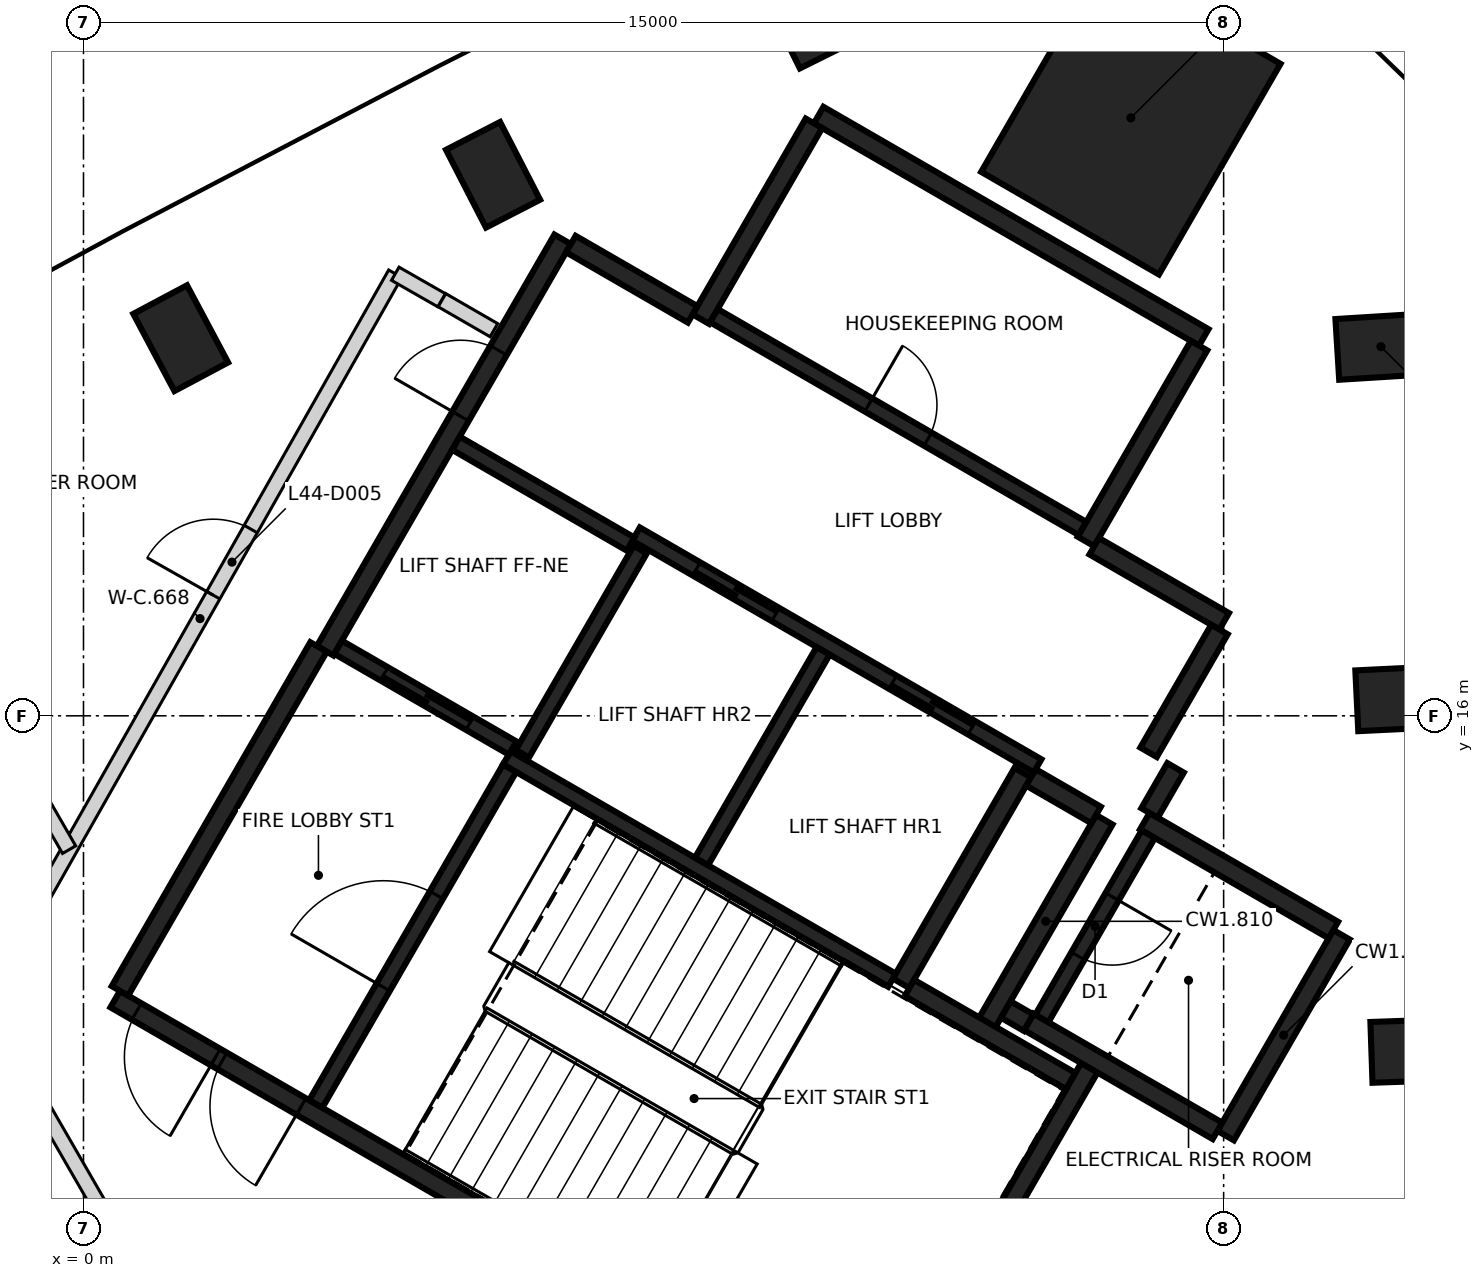
"""IFC4 building model, lengths in metres.
Left out: names, types, materials, properties, quantities, classifications, styles, units other than length and angle.
Written with IfcOpenShell. Run it as: python <this file> out.ifc"""

import sys

from ifc_helpers import new_model, si_unit, direction, frame, frame_2d, origin, origin_2d, place, context, subcontext, project, spatial, rectangle, extrude, element, fill, save


model = new_model("IFC4")
c1 = context("Model", 3, precision=1e-05, world=origin(), true_north=direction((0.0, 1.0)))
c2 = subcontext(c1, "Body", "Model", "MODEL_VIEW")
j1 = project(units=[si_unit("LENGTHUNIT", "METRE"), si_unit("PLANEANGLEUNIT", "RADIAN")], contexts=[c1])
p1 = place(None, origin())
s1 = spatial("IfcSite", under=j1, at=p1, CompositionType="ELEMENT")
p2 = place(p1, origin())
s2 = spatial("IfcBuilding", under=s1, at=p2, CompositionType="ELEMENT")
p3 = place(p2, frame((0.0, 0.0, 179.2)))
s3 = spatial("IfcBuildingStorey", under=s2, at=p3, CompositionType="ELEMENT", Elevation=179.2)
for number, where, z_axis, x_axis in (
    (1, (17.519, 11.592, -0.35), (0.0, 0.0, 1.0), (0.999, 0.034, 0.0)),
    (2, (17.326, 16.226, -0.35), (0.0, 0.0, 1.0), (0.999, 0.048, 0.0)),
    (3, (17.07, 20.856, -0.35), (0.0, 0.0, 1.0), (0.998, 0.062, 0.0)),
    (4, (9.527, 25.211, -0.35), (0.0, 0.0, 1.0), (-0.445, 0.895, 0.0)),
    (5, (5.388, 23.118, -0.35), (0.0, 0.0, 1.0), (-0.458, 0.889, 0.0)),
    (6, (1.279, 20.968, -0.35), (0.0, 0.0, 1.0), (-0.47, 0.883, 0.0)),
):
    element("IfcColumn", number, at=place(p3, frame(where, z_axis=z_axis, x_axis=x_axis)), inside=s3, PredefinedType="COLUMN", context=c2, shape_type="SweptSolid", body=[
        extrude(rectangle(XDim=1.15, YDim=0.8, at=origin_2d()), origin(), (0.0, 0.0, 1.0), 3.6),
    ])
p4 = place(p3, frame((13.78, 23.867, -0.35), z_axis=(0.0, 0.0, 1.0), x_axis=(0.5, 0.866025403784, 0.0)))
e7 = element("IfcColumn", 7, at=p4, inside=s3, PredefinedType="COLUMN", context=c2, shape_type="SweptSolid", body=[
    extrude(rectangle(XDim=3.2, YDim=2.7, at=origin_2d()), origin(), (0.0, 0.0, 1.0), 3.6),
])
p5 = place(p3, frame((10.42, 6.498, 0.0), z_axis=(0.0, 0.0, 1.0), x_axis=(-0.866021906294, 0.500006057782, 0.0)))
e8 = element("IfcWall", 8, at=p5, inside=s3, PredefinedType="SHEAR", context=c2, shape_type="SweptSolid", body=[
    extrude(rectangle(XDim=11.55, YDim=0.25, at=frame_2d((5.775, 0.0))), origin(), (0.0, 0.0, 1.0), 3.25),
])
p6 = place(p5, frame((10.025, 0.0, 0.0)))
e9 = element("IfcOpeningElement", 9, at=p6, cuts=e8, PredefinedType="OPENING", context=c2, shape_type="SweptSolid", body=[
    extrude(rectangle(XDim=1.2, YDim=2.1, at=frame_2d((0.6, 1.05))), frame((0.0, 0.135, 0.0), z_axis=(0.0, -1.0, 0.0), x_axis=(1.0, 0.0, 0.0)), (0.0, 0.0, 1.0), 0.27),
])
p7 = place(p5, frame((8.725, 0.0, 0.0)))
e10 = element("IfcOpeningElement", 10, at=p7, cuts=e8, PredefinedType="OPENING", context=c2, shape_type="SweptSolid", body=[
    extrude(rectangle(XDim=1.2, YDim=2.1, at=frame_2d((0.6, 1.05))), frame((0.0, 0.135, 0.0), z_axis=(0.0, -1.0, 0.0), x_axis=(1.0, 0.0, 0.0)), (0.0, 0.0, 1.0), 0.27),
])
p8 = place(p3, frame((3.179, 16.856, 0.0), z_axis=(0.0, 0.0, 1.0), x_axis=(0.500004234368, 0.866022959057, 0.0)))
e11 = element("IfcWall", 11, at=p8, inside=s3, PredefinedType="SHEAR", context=c2, shape_type="SweptSolid", body=[
    extrude(rectangle(XDim=6.25, YDim=0.25, at=frame_2d((3.125, 0.0))), origin(), (0.0, 0.0, 1.0), 3.25),
])
p9 = place(p8, frame((3.563, 0.0, 0.0)))
e12 = element("IfcOpeningElement", 12, at=p9, cuts=e11, PredefinedType="OPENING", context=c2, shape_type="SweptSolid", body=[
    extrude(rectangle(XDim=1.0, YDim=2.1, at=frame_2d((0.5, 1.05))), frame((0.0, 0.135, 0.0), z_axis=(0.0, -1.0, 0.0), x_axis=(1.0, 0.0, 0.0)), (0.0, 0.0, 1.0), 0.27),
])
p10 = place(p3, frame((9.673, 23.903, 0.0), z_axis=(0.0, 0.0, 1.0), x_axis=(0.86603616409, -0.499981362141, 0.0)))
e13 = element("IfcWall", 13, at=p10, inside=s3, PredefinedType="SHEAR", context=c2, shape_type="SweptSolid", body=[
    extrude(rectangle(XDim=5.85, YDim=0.25, at=frame_2d((2.925, 0.0))), origin(), (0.0, 0.0, 1.0), 3.25),
])
p11 = place(p3, frame((0.48, 12.381, 0.0), z_axis=(0.0, 0.0, 1.0), x_axis=(0.49999885962, 0.866026062182, 0.0)))
e14 = element("IfcWall", 14, at=p11, inside=s3, PredefinedType="SHEAR", context=c2, shape_type="SweptSolid", body=[
    extrude(rectangle(XDim=5.225, YDim=0.25, at=frame_2d((2.612, 0.0))), origin(), (0.0, 0.0, 1.0), 3.25),
])
p12 = place(p3, frame((13.238, 11.378, 0.0), z_axis=(0.0, 0.0, 1.0), x_axis=(-0.500008851346, -0.866020293397, 0.0)))
e15 = element("IfcWall", 15, at=p12, inside=s3, PredefinedType="SHEAR", context=c2, shape_type="SweptSolid", body=[
    extrude(rectangle(XDim=5.51, YDim=0.25, at=frame_2d((2.755, 0.0))), origin(), (0.0, 0.0, 1.0), 3.25),
])
p13 = place(p3, frame((12.357, 15.252, 0.0), z_axis=(0.0, 0.0, 1.0), x_axis=(-0.500028443584, -0.866008981251, 0.0)))
e16 = element("IfcWall", 16, at=p13, inside=s3, PredefinedType="SHEAR", context=c2, shape_type="SweptSolid", body=[
    extrude(rectangle(XDim=3.2, YDim=0.25, at=frame_2d((1.6, 0.0))), origin(), (0.0, 0.0, 1.0), 3.25),
])
for number, where, z_axis, x_axis in (
    (17, (8.123, 21.219, 0.0), (0.0, 0.0, 1.0), (0.5, 0.866, 0.0)),
    (18, (14.676, 20.87, 0.0), (0.0, 0.0, 1.0), (-0.5, -0.866, 0.0)),
):
    element("IfcWall", number, at=place(p3, frame(where, z_axis=z_axis, x_axis=x_axis)), inside=s3, PredefinedType="SHEAR", context=c2, shape_type="SweptSolid", body=[
        extrude(rectangle(XDim=2.975, YDim=0.25, at=frame_2d((1.487, 0.0))), origin(), (0.0, 0.0, 1.0), 3.25),
    ])
p14 = place(p3, frame((16.552, 13.119, 0.0), z_axis=(0.0, 0.0, 1.0), x_axis=(-0.499978833458, -0.866037623948, 0.0)))
e19 = element("IfcWall", 19, at=p14, inside=s3, PredefinedType="SHEAR", context=c2, shape_type="SweptSolid", body=[
    extrude(rectangle(XDim=3.05, YDim=0.25, at=frame_2d((1.525, 0.0))), origin(), (0.0, 0.0, 1.0), 3.25),
])
p15 = place(p3, frame((14.918, 10.54, 0.0), z_axis=(0.0, 0.0, 1.0), x_axis=(-0.866063538972, 0.499933942099, 0.0)))
e20 = element("IfcWall", 20, at=p15, inside=s3, PredefinedType="SHEAR", context=c2, shape_type="SweptSolid", body=[
    extrude(rectangle(XDim=2.865, YDim=0.25, at=frame_2d((1.432, 0.0))), origin(), (0.0, 0.0, 1.0), 3.25),
])
p16 = place(p3, frame((13.963, 14.614, 0.0), z_axis=(0.0, 0.0, 1.0), x_axis=(0.866042235819, -0.499970844928, 0.0)))
e21 = element("IfcWall", 21, at=p16, inside=s3, PredefinedType="SHEAR", context=c2, shape_type="SweptSolid", body=[
    extrude(rectangle(XDim=2.865, YDim=0.25, at=frame_2d((1.432, 0.0))), origin(), (0.0, 0.0, 1.0), 3.25),
])
p17 = place(p3, frame((11.888, 11.961, 0.0), z_axis=(0.0, 0.0, 1.0), x_axis=(0.500003324108, 0.866023484601, 0.0)))
e22 = element("IfcWall", 22, at=p17, inside=s3, PredefinedType="SHEAR", context=c2, shape_type="SweptSolid", body=[
    extrude(rectangle(XDim=3.085, YDim=0.25, at=frame_2d((1.542, 0.0))), origin(), (0.0, 0.0, 1.0), 3.25),
])
p18 = place(p3, frame((10.865, 12.418, 0.0), z_axis=(0.0, 0.0, 1.0), x_axis=(0.866026229868, -0.499998569178, 0.0)))
e23 = element("IfcWall", 23, at=p18, inside=s3, PredefinedType="SHEAR", context=c2, shape_type="SweptSolid", body=[
    extrude(rectangle(XDim=2.449, YDim=0.25, at=frame_2d((1.225, 0.0))), origin(), (0.0, 0.0, 1.0), 3.25),
])
p19 = place(p3, frame((13.297, 18.231, 0.0), z_axis=(0.0, 0.0, 1.0), x_axis=(0.866043531843, -0.499968599967, 0.0)))
e24 = element("IfcWall", 24, at=p19, inside=s3, PredefinedType="SHEAR", context=c2, shape_type="SweptSolid", body=[
    extrude(rectangle(XDim=1.975, YDim=0.25, at=frame_2d((0.987, 0.0))), origin(), (0.0, 0.0, 1.0), 3.25),
])
p20 = place(p3, frame((6.413, 22.206, 0.0), z_axis=(0.0, 0.0, 1.0), x_axis=(0.866016279763, -0.500015802937, 0.0)))
e25 = element("IfcWall", 25, at=p20, inside=s3, PredefinedType="SHEAR", context=c2, shape_type="SweptSolid", body=[
    extrude(rectangle(XDim=1.849, YDim=0.25, at=frame_2d((0.925, 0.0))), origin(), (0.0, 0.0, 1.0), 3.25),
])
p21 = place(p3, frame((14.945, 17.135, 0.0), z_axis=(0.0, 0.0, 1.0), x_axis=(-0.499983108224, -0.866035156036, 0.0)))
e26 = element("IfcWall", 26, at=p21, inside=s3, PredefinedType="SHEAR", context=c2, shape_type="SweptSolid", body=[
    extrude(rectangle(XDim=1.865, YDim=0.25, at=frame_2d((0.932, 0.0))), origin(), (0.0, 0.0, 1.0), 3.25),
])
p22 = place(p3, frame((13.322, 14.695, 0.0), z_axis=(0.0, 0.0, 1.0), x_axis=(-0.866017078145, 0.500014420154, 0.0)))
e27 = element("IfcWall", 27, at=p22, inside=s3, PredefinedType="SHEAR", context=c2, shape_type="SweptSolid", body=[
    extrude(rectangle(XDim=0.989, YDim=0.25, at=frame_2d((0.495, 0.0))), origin(), (0.0, 0.0, 1.0), 3.25),
])
p23 = place(p3, frame((14.368, 15.315, 0.0), z_axis=(0.0, 0.0, 1.0), x_axis=(-0.499897359611, -0.866084655132, 0.0)))
e28 = element("IfcWall", 28, at=p23, inside=s3, PredefinedType="SHEAR", context=c2, shape_type="SweptSolid", body=[
    extrude(rectangle(XDim=0.685, YDim=0.25, at=frame_2d((0.342, 0.0))), origin(), (0.0, 0.0, 1.0), 3.25),
])
p24 = place(p3, frame((12.433, 11.964, 0.0), z_axis=(0.0, 0.0, 1.0), x_axis=(-0.866055875208, 0.499947218231, 0.0)))
e29 = element("IfcWall", 29, at=p24, inside=s3, PredefinedType="SHEAR", context=c2, shape_type="SweptSolid", body=[
    extrude(rectangle(XDim=0.345, YDim=0.25, at=frame_2d((0.172, 0.0))), origin(), (0.0, 0.0, 1.0), 3.25),
])
p25 = place(p3, frame((12.552, 15.342, 0.0), z_axis=(0.0, 0.0, 1.0), x_axis=(-0.866030299012, 0.499991521122, 0.0)))
e30 = element("IfcWall", 30, at=p25, inside=s3, PredefinedType="SHEAR", context=c2, shape_type="SweptSolid", body=[
    extrude(rectangle(XDim=6.1, YDim=0.2, at=frame_2d((3.05, 0.0))), origin(), (0.0, 0.0, 1.0), 3.25),
])
p26 = place(p25, frame((1.0, 0.0, 0.0)))
e31 = element("IfcOpeningElement", 31, at=p26, cuts=e30, PredefinedType="OPENING", context=c2, shape_type="SweptSolid", body=[
    extrude(rectangle(XDim=1.2, YDim=2.1, at=frame_2d((0.6, 1.05))), frame((0.0, 0.11, 0.0), z_axis=(0.0, -1.0, 0.0), x_axis=(1.0, 0.0, 0.0)), (0.0, 0.0, 1.0), 0.22),
])
p27 = place(p25, frame((3.982, 0.0, 0.0)))
e32 = element("IfcOpeningElement", 32, at=p27, cuts=e30, PredefinedType="OPENING", context=c2, shape_type="SweptSolid", body=[
    extrude(rectangle(XDim=1.2, YDim=2.1, at=frame_2d((0.6, 1.05))), frame((0.0, 0.11, 0.0), z_axis=(0.0, -1.0, 0.0), x_axis=(1.0, 0.0, 0.0)), (0.0, 0.0, 1.0), 0.22),
])
p28 = place(p3, frame((10.636, 12.521, 0.0), z_axis=(0.0, 0.0, 1.0), x_axis=(-0.866013252188, 0.500021046592, 0.0)))
e33 = element("IfcWall", 33, at=p28, inside=s3, PredefinedType="SHEAR", context=c2, shape_type="SweptSolid", body=[
    extrude(rectangle(XDim=5.851, YDim=0.2, at=frame_2d((2.925, 0.0))), origin(), (0.0, 0.0, 1.0), 3.25),
])
p29 = place(p3, frame((8.294, 21.264, 0.0), z_axis=(0.0, 0.0, 1.0), x_axis=(0.866025812541, -0.499999292012, 0.0)))
e34 = element("IfcWall", 34, at=p29, inside=s3, PredefinedType="SHEAR", context=c2, shape_type="SweptSolid", body=[
    extrude(rectangle(XDim=5.598, YDim=0.2, at=frame_2d((2.799, 0.0))), origin(), (0.0, 0.0, 1.0), 3.25),
])
p30 = place(p29, frame((2.349, 0.0, 0.0)))
e35 = element("IfcOpeningElement", 35, at=p30, cuts=e34, PredefinedType="OPENING", context=c2, shape_type="SweptSolid", body=[
    extrude(rectangle(XDim=0.9, YDim=2.1, at=frame_2d((0.45, 1.05))), frame((0.0, 0.11, 0.0), z_axis=(0.0, -1.0, 0.0), x_axis=(1.0, 0.0, 0.0)), (0.0, 0.0, 1.0), 0.22),
])
p31 = place(p3, frame((3.057, 10.895, 0.0), z_axis=(0.0, 0.0, 1.0), x_axis=(0.500027839223, 0.866009330205, 0.0)))
e36 = element("IfcWall", 36, at=p31, inside=s3, PredefinedType="SHEAR", context=c2, shape_type="SweptSolid", body=[
    extrude(rectangle(XDim=5.098, YDim=0.2, at=frame_2d((2.549, 0.0))), origin(), (0.0, 0.0, 1.0), 3.25),
])
p32 = place(p31, frame((1.774, 0.0, 0.0)))
e37 = element("IfcOpeningElement", 37, at=p32, cuts=e36, PredefinedType="OPENING", context=c2, shape_type="SweptSolid", body=[
    extrude(rectangle(XDim=1.4, YDim=2.1, at=frame_2d((0.7, 1.05))), frame((0.0, 0.11, 0.0), z_axis=(0.0, -1.0, 0.0), x_axis=(1.0, 0.0, 0.0)), (0.0, 0.0, 1.0), 0.22),
])
p33 = place(p3, frame((8.132, 14.084, 0.0), z_axis=(0.0, 0.0, 1.0), x_axis=(0.500030834389, 0.86600760081, 0.0)))
e38 = element("IfcWall", 38, at=p33, inside=s3, PredefinedType="SHEAR", context=c2, shape_type="SweptSolid", body=[
    extrude(rectangle(XDim=3.198, YDim=0.2, at=frame_2d((1.599, 0.0))), origin(), (0.0, 0.0, 1.0), 3.25),
])
p34 = place(p3, frame((14.008, 14.442, 0.0), z_axis=(0.0, 0.0, 1.0), x_axis=(-0.499986818241, -0.866033014143, 0.0)))
e39 = element("IfcWall", 39, at=p34, inside=s3, PredefinedType="SHEAR", context=c2, shape_type="SweptSolid", body=[
    extrude(rectangle(XDim=2.798, YDim=0.2, at=frame_2d((1.399, 0.0))), origin(), (0.0, 0.0, 1.0), 3.25),
])
p35 = place(p34, frame((0.949, 0.0, 0.0)))
e40 = element("IfcOpeningElement", 40, at=p35, cuts=e39, PredefinedType="OPENING", context=c2, shape_type="SweptSolid", body=[
    extrude(rectangle(XDim=0.9, YDim=2.1, at=frame_2d((0.45, 1.05))), frame((0.0, 0.11, 0.0), z_axis=(0.0, -1.0, 0.0), x_axis=(1.0, 0.0, 0.0)), (0.0, 0.0, 1.0), 0.22),
])
p36 = place(p3, frame((7.324, 18.187, 0.0), z_axis=(0.0, 0.0, 1.0), x_axis=(-0.499967891604, -0.866043940782, 0.0)))
e41 = element("IfcWall", 41, at=p36, inside=s3, PredefinedType="SHEAR", context=c2, shape_type="SweptSolid", body=[
    extrude(rectangle(XDim=3.1, YDim=0.2, at=frame_2d((1.55, 0.0))), origin(), (0.0, 0.0, 1.0), 3.25),
])
p37 = place(p3, frame((5.646, 15.576, 0.0), z_axis=(0.0, 0.0, 1.0), x_axis=(-0.866018407898, 0.500012117035, 0.0)))
e42 = element("IfcWall", 42, at=p37, inside=s3, PredefinedType="SHEAR", context=c2, shape_type="SweptSolid", body=[
    extrude(rectangle(XDim=2.651, YDim=0.2, at=frame_2d((1.325, 0.0))), origin(), (0.0, 0.0, 1.0), 3.25),
])
p38 = place(p37, frame((0.652, 0.0, 0.0)))
e43 = element("IfcOpeningElement", 43, at=p38, cuts=e42, PredefinedType="OPENING", context=c2, shape_type="SweptSolid", body=[
    extrude(rectangle(XDim=1.3, YDim=2.1, at=frame_2d((0.65, 1.05))), frame((0.0, 0.11, 0.0), z_axis=(0.0, -1.0, 0.0), x_axis=(1.0, 0.0, 0.0)), (0.0, 0.0, 1.0), 0.22),
])
p39 = place(p3, frame((7.196, 18.26, 0.0), z_axis=(0.0, 0.0, 1.0), x_axis=(-0.866018407898, 0.500012117035, 0.0)))
e44 = element("IfcWall", 44, at=p39, inside=s3, PredefinedType="SHEAR", context=c2, shape_type="SweptSolid", body=[
    extrude(rectangle(XDim=2.651, YDim=0.2, at=frame_2d((1.325, 0.0))), origin(), (0.0, 0.0, 1.0), 3.25),
])
p40 = place(p3, frame((-1.035, 12.742, 0.0), z_axis=(0.0, 0.0, 1.0), x_axis=(0.49267817774, 0.870211591039, 0.0)))
e45 = element("IfcWall", 45, at=p40, inside=s3, PredefinedType="PARTITIONING", context=c2, shape_type="SweptSolid", body=[
    extrude(rectangle(XDim=10.427, YDim=0.2, at=frame_2d((5.214, 0.0))), origin(), (0.0, 0.0, 1.0), 3.25),
])
p41 = place(p40, frame((5.568, 0.0, 0.0)))
e46 = element("IfcOpeningElement", 46, at=p41, cuts=e45, PredefinedType="OPENING", context=c2, shape_type="SweptSolid", body=[
    extrude(rectangle(XDim=1.0, YDim=2.1, at=frame_2d((0.5, 1.05))), frame((0.0, 0.11, 0.0), z_axis=(0.0, -1.0, 0.0), x_axis=(1.0, 0.0, 0.0)), (0.0, 0.0, 1.0), 0.22),
])
p42 = place(p3, frame((-1.019, 11.68, 0.0), z_axis=(0.0, 0.0, 1.0), x_axis=(0.499921088291, -0.866070958688, 0.0)))
e47 = element("IfcWall", 47, at=p42, inside=s3, PredefinedType="PARTITIONING", context=c2, shape_type="SweptSolid", body=[
    extrude(rectangle(XDim=2.625, YDim=0.2, at=frame_2d((1.312, 0.0))), origin(), (0.0, 0.0, 1.0), 3.25),
])
p43 = place(p3, frame((4.102, 21.816, 0.0), z_axis=(0.0, 0.0, 1.0), x_axis=(0.868007826562, -0.496550514074, 0.0)))
e48 = element("IfcWall", 48, at=p43, inside=s3, PredefinedType="PARTITIONING", context=c2, shape_type="SweptSolid", body=[
    extrude(rectangle(XDim=0.703, YDim=0.2, at=frame_2d((0.351, 0.0))), origin(), (0.0, 0.0, 1.0), 3.25),
])
p44 = place(p3, frame((4.716, 21.468, 0.0), z_axis=(0.0, 0.0, 1.0), x_axis=(0.865912682783, -0.500195187698, 0.0)))
e49 = element("IfcWall", 49, at=p44, inside=s3, PredefinedType="PARTITIONING", context=c2, shape_type="SweptSolid", body=[
    extrude(rectangle(XDim=0.79, YDim=0.2, at=frame_2d((0.395, 0.0))), origin(), (0.0, 0.0, 1.0), 3.25),
])
p45 = place(p3, frame((-3.598, 20.142, 0.0), z_axis=(0.0, 0.0, 1.0), x_axis=(0.500075890333, -0.865981584047, 0.0)))
e50 = element("IfcWall", 50, at=p45, inside=s3, PredefinedType="PARTITIONING", context=c2, shape_type="SweptSolid", body=[
    extrude(rectangle(XDim=6.816, YDim=0.2, at=frame_2d((3.408, 0.0))), origin(), (0.0, 0.0, 1.0), 3.25),
])
p46 = place(p38, origin())
e51 = element("IfcDoor", 51, at=p46, inside=s3, OperationType="SLIDING_TO_LEFT", PredefinedType="DOOR", context=c2, shape_type="SweptSolid", body=[
    extrude(rectangle(XDim=1.3, YDim=2.1, at=frame_2d((0.65, 1.05))), frame((0.0, 0.025, 0.0), z_axis=(0.0, -1.0, 0.0), x_axis=(1.0, 0.0, 0.0)), (0.0, 0.0, 1.0), 0.05),
])
fill(e43, e51)
p47 = place(p26, origin())
e52 = element("IfcDoor", 52, at=p47, inside=s3, OperationType="DOUBLE_DOOR_SLIDING", PredefinedType="DOOR", context=c2, shape_type="SweptSolid", body=[
    extrude(rectangle(XDim=1.2, YDim=2.1, at=frame_2d((0.6, 1.05))), frame((0.0, 0.025, 0.0), z_axis=(0.0, -1.0, 0.0), x_axis=(1.0, 0.0, 0.0)), (0.0, 0.0, 1.0), 0.05),
])
fill(e31, e52)
p48 = place(p27, origin())
e53 = element("IfcDoor", 53, at=p48, inside=s3, OperationType="DOUBLE_DOOR_SLIDING", PredefinedType="DOOR", context=c2, shape_type="SweptSolid", body=[
    extrude(rectangle(XDim=1.2, YDim=2.1, at=frame_2d((0.6, 1.05))), frame((0.0, 0.025, 0.0), z_axis=(0.0, -1.0, 0.0), x_axis=(1.0, 0.0, 0.0)), (0.0, 0.0, 1.0), 0.05),
])
fill(e32, e53)
p49 = place(p9, origin())
e54 = element("IfcDoor", 54, at=p49, inside=s3, OperationType="SINGLE_SWING_LEFT", PredefinedType="DOOR", context=c2, shape_type="SweptSolid", body=[
    extrude(rectangle(XDim=1.0, YDim=2.1, at=frame_2d((0.5, 1.05))), frame((0.0, 0.025, 0.0), z_axis=(0.0, -1.0, 0.0), x_axis=(1.0, 0.0, 0.0)), (0.0, 0.0, 1.0), 0.05),
])
fill(e12, e54)
p50 = place(p6, origin())
e55 = element("IfcDoor", 55, at=p50, inside=s3, OperationType="SINGLE_SWING_LEFT", PredefinedType="DOOR", context=c2, shape_type="SweptSolid", body=[
    extrude(rectangle(XDim=1.2, YDim=2.1, at=frame_2d((0.6, 1.05))), frame((0.0, 0.025, 0.0), z_axis=(0.0, -1.0, 0.0), x_axis=(1.0, 0.0, 0.0)), (0.0, 0.0, 1.0), 0.05),
])
fill(e9, e55)
p51 = place(p7, origin())
e56 = element("IfcDoor", 56, at=p51, inside=s3, OperationType="SINGLE_SWING_RIGHT", PredefinedType="DOOR", context=c2, shape_type="SweptSolid", body=[
    extrude(rectangle(XDim=1.2, YDim=2.1, at=frame_2d((0.6, 1.05))), frame((0.0, 0.025, 0.0), z_axis=(0.0, -1.0, 0.0), x_axis=(1.0, 0.0, 0.0)), (0.0, 0.0, 1.0), 0.05),
])
fill(e10, e56)
p52 = place(p32, origin())
e57 = element("IfcDoor", 57, at=p52, inside=s3, OperationType="SINGLE_SWING_LEFT", PredefinedType="DOOR", context=c2, shape_type="SweptSolid", body=[
    extrude(rectangle(XDim=1.4, YDim=2.1, at=frame_2d((0.7, 1.05))), frame((0.0, 0.025, 0.0), z_axis=(0.0, -1.0, 0.0), x_axis=(1.0, 0.0, 0.0)), (0.0, 0.0, 1.0), 0.05),
])
fill(e37, e57)
p53 = place(p30, origin())
e58 = element("IfcDoor", 58, at=p53, inside=s3, OperationType="SINGLE_SWING_RIGHT", PredefinedType="DOOR", context=c2, shape_type="SweptSolid", body=[
    extrude(rectangle(XDim=0.9, YDim=2.1, at=frame_2d((0.45, 1.05))), frame((0.0, 0.025, 0.0), z_axis=(0.0, -1.0, 0.0), x_axis=(1.0, 0.0, 0.0)), (0.0, 0.0, 1.0), 0.05),
])
fill(e35, e58)
p54 = place(p35, origin())
e59 = element("IfcDoor", 59, at=p54, inside=s3, OperationType="SINGLE_SWING_LEFT", PredefinedType="DOOR", context=c2, shape_type="SweptSolid", body=[
    extrude(rectangle(XDim=0.9, YDim=2.1, at=frame_2d((0.45, 1.05))), frame((0.0, 0.025, 0.0), z_axis=(0.0, -1.0, 0.0), x_axis=(1.0, 0.0, 0.0)), (0.0, 0.0, 1.0), 0.05),
])
fill(e40, e59)
p55 = place(p41, origin())
e60 = element("IfcDoor", 60, at=p55, inside=s3, OperationType="SINGLE_SWING_LEFT", PredefinedType="DOOR", context=c2, shape_type="SweptSolid", body=[
    extrude(rectangle(XDim=1.0, YDim=2.1, at=frame_2d((0.5, 1.05))), frame((0.0, 0.025, 0.0), z_axis=(0.0, -1.0, 0.0), x_axis=(1.0, 0.0, 0.0)), (0.0, 0.0, 1.0), 0.05),
])
fill(e46, e60)
save(model, sys.argv[1])
